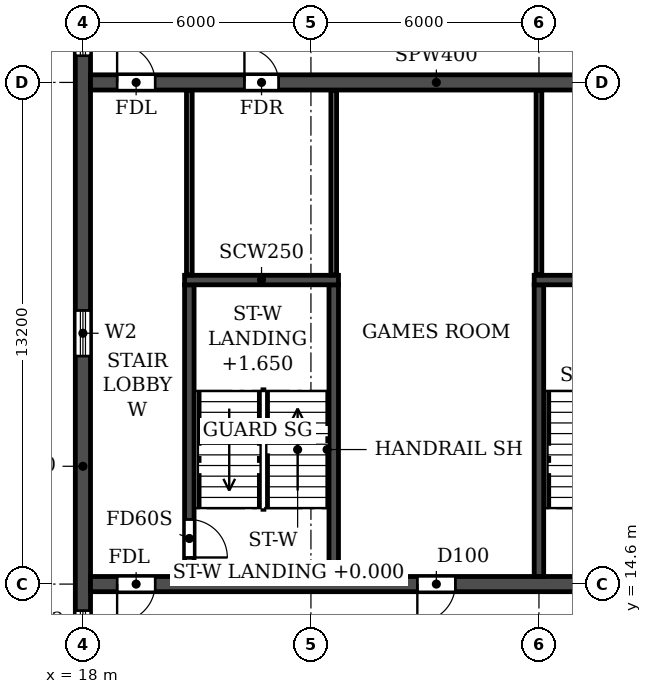
"""IFC4 building model, lengths in metres.
Left out: names, types, materials, properties, quantities, classifications, styles, units other than length and angle.
Written with IfcOpenShell. Run it as: python <this file> out.ifc"""

import sys

from ifc_helpers import new_model, si_unit, direction, frame, frame_2d, origin, place, context, subcontext, project, spatial, rectangle, extrude, element, fill, save


model = new_model("IFC4")
c1 = context("Model", 3, precision=1e-05, world=origin(), true_north=direction((0.0, 1.0)))
c2 = subcontext(c1, "Body", "Model", "MODEL_VIEW")
j1 = project(units=[si_unit("LENGTHUNIT", "METRE"), si_unit("PLANEANGLEUNIT", "RADIAN")], contexts=[c1])
p1 = place(None, origin())
s1 = spatial("IfcSite", under=j1, at=p1, CompositionType="ELEMENT")
p2 = place(p1, origin())
s2 = spatial("IfcBuilding", under=s1, at=p2, CompositionType="ELEMENT")
p3 = place(p2, frame((0.0, 0.0, 201.6)))
s3 = spatial("IfcBuildingStorey", under=s2, at=p3, CompositionType="ELEMENT", Elevation=201.6)
p4 = place(p3, frame((18.0, 4.683, 0.0), z_axis=(0.0, 0.0, 1.0), x_axis=(0.0, 1.0, 0.0)))
e1 = element("IfcWall", 1, at=p4, inside=s3, PredefinedType="SHEAR", context=c2, shape_type="SweptSolid", body=[
    extrude(rectangle(XDim=31.834, YDim=0.4, at=frame_2d((15.917, 0.0))), origin(), (0.0, 0.0, 1.0), 3.08),
])
p5 = place(p4, frame((23.817, 0.0, 0.9)))
e2 = element("IfcOpeningElement", 2, at=p5, cuts=e1, PredefinedType="OPENING", context=c2, shape_type="SweptSolid", body=[
    extrude(rectangle(XDim=1.2, YDim=1.5, at=frame_2d((0.6, 0.75))), frame((0.0, 0.21, 0.0), z_axis=(0.0, -1.0, 0.0), x_axis=(1.0, 0.0, 0.0)), (0.0, 0.0, 1.0), 0.42),
])
p6 = place(p4, frame((8.017, 0.0, 0.9)))
e3 = element("IfcOpeningElement", 3, at=p6, cuts=e1, PredefinedType="OPENING", context=c2, shape_type="SweptSolid", body=[
    extrude(rectangle(XDim=1.2, YDim=1.5, at=frame_2d((0.6, 0.75))), frame((0.0, 0.21, 0.0), z_axis=(0.0, -1.0, 0.0), x_axis=(1.0, 0.0, 0.0)), (0.0, 0.0, 1.0), 0.42),
])
p7 = place(p4, frame((27.694, 0.0, 0.6)))
e4 = element("IfcOpeningElement", 4, at=p7, cuts=e1, PredefinedType="OPENING", context=c2, shape_type="SweptSolid", body=[
    extrude(rectangle(XDim=2.2, YDim=1.8, at=frame_2d((1.1, 0.9))), frame((0.0, 0.21, 0.0), z_axis=(0.0, -1.0, 0.0), x_axis=(1.0, 0.0, 0.0)), (0.0, 0.0, 1.0), 0.42),
])
p8 = place(p4, frame((2.541, 0.0, 0.6)))
e5 = element("IfcOpeningElement", 5, at=p8, cuts=e1, PredefinedType="OPENING", context=c2, shape_type="SweptSolid", body=[
    extrude(rectangle(XDim=2.2, YDim=1.8, at=frame_2d((1.1, 0.9))), frame((0.0, 0.21, 0.0), z_axis=(0.0, -1.0, 0.0), x_axis=(1.0, 0.0, 0.0)), (0.0, 0.0, 1.0), 0.42),
])
p9 = place(p4, frame((15.917, 0.0, 0.9)))
e6 = element("IfcOpeningElement", 6, at=p9, cuts=e1, PredefinedType="OPENING", context=c2, shape_type="SweptSolid", body=[
    extrude(rectangle(XDim=1.2, YDim=1.5, at=frame_2d((0.6, 0.75))), frame((0.0, 0.21, 0.0), z_axis=(0.0, -1.0, 0.0), x_axis=(1.0, 0.0, 0.0)), (0.0, 0.0, 1.0), 0.42),
])
p10 = place(p3, frame((18.2, 14.6, 0.0), z_axis=(0.0, 0.0, 1.0), x_axis=(1.0, 0.0, 0.0)))
e7 = element("IfcWall", 7, at=p10, inside=s3, PredefinedType="SOLIDWALL", context=c2, shape_type="SweptSolid", body=[
    extrude(rectangle(XDim=65.6, YDim=0.4, at=frame_2d((32.8, 0.0))), origin(), (0.0, 0.0, 1.0), 3.08),
])
p11 = place(p10, frame((0.7, 0.0, 0.0)))
e8 = element("IfcOpeningElement", 8, at=p11, cuts=e7, PredefinedType="OPENING", context=c2, shape_type="SweptSolid", body=[
    extrude(rectangle(XDim=1.0, YDim=2.1, at=frame_2d((0.5, 1.05))), frame((0.0, 0.21, 0.0), z_axis=(0.0, -1.0, 0.0), x_axis=(1.0, 0.0, 0.0)), (0.0, 0.0, 1.0), 0.42),
])
p12 = place(p10, frame((8.6, 0.0, 0.0)))
e9 = element("IfcOpeningElement", 9, at=p12, cuts=e7, PredefinedType="OPENING", context=c2, shape_type="SweptSolid", body=[
    extrude(rectangle(XDim=1.0, YDim=2.1, at=frame_2d((0.5, 1.05))), frame((0.0, 0.21, 0.0), z_axis=(0.0, -1.0, 0.0), x_axis=(1.0, 0.0, 0.0)), (0.0, 0.0, 1.0), 0.42),
])
p13 = place(p10, frame((13.2, 0.0, 0.0)))
e10 = element("IfcOpeningElement", 10, at=p13, cuts=e7, PredefinedType="OPENING", context=c2, shape_type="SweptSolid", body=[
    extrude(rectangle(XDim=1.0, YDim=2.1, at=frame_2d((0.5, 1.05))), frame((0.0, 0.21, 0.0), z_axis=(0.0, -1.0, 0.0), x_axis=(1.0, 0.0, 0.0)), (0.0, 0.0, 1.0), 0.42),
])
p14 = place(p10, frame((27.1, 0.0, 0.0)))
e11 = element("IfcOpeningElement", 11, at=p14, cuts=e7, PredefinedType="OPENING", context=c2, shape_type="SweptSolid", body=[
    extrude(rectangle(XDim=1.0, YDim=2.1, at=frame_2d((0.5, 1.05))), frame((0.0, 0.21, 0.0), z_axis=(0.0, -1.0, 0.0), x_axis=(1.0, 0.0, 0.0)), (0.0, 0.0, 1.0), 0.42),
])
p15 = place(p10, frame((32.3, 0.0, 0.0)))
e12 = element("IfcOpeningElement", 12, at=p15, cuts=e7, PredefinedType="OPENING", context=c2, shape_type="SweptSolid", body=[
    extrude(rectangle(XDim=1.0, YDim=2.1, at=frame_2d((0.5, 1.05))), frame((0.0, 0.21, 0.0), z_axis=(0.0, -1.0, 0.0), x_axis=(1.0, 0.0, 0.0)), (0.0, 0.0, 1.0), 0.42),
])
p16 = place(p10, frame((34.9, 0.0, 0.0)))
e13 = element("IfcOpeningElement", 13, at=p16, cuts=e7, PredefinedType="OPENING", context=c2, shape_type="SweptSolid", body=[
    extrude(rectangle(XDim=1.0, YDim=2.1, at=frame_2d((0.5, 1.05))), frame((0.0, 0.21, 0.0), z_axis=(0.0, -1.0, 0.0), x_axis=(1.0, 0.0, 0.0)), (0.0, 0.0, 1.0), 0.42),
])
p17 = place(p10, frame((38.8, 0.0, 0.0)))
e14 = element("IfcOpeningElement", 14, at=p17, cuts=e7, PredefinedType="OPENING", context=c2, shape_type="SweptSolid", body=[
    extrude(rectangle(XDim=1.0, YDim=2.1, at=frame_2d((0.5, 1.05))), frame((0.0, 0.21, 0.0), z_axis=(0.0, -1.0, 0.0), x_axis=(1.0, 0.0, 0.0)), (0.0, 0.0, 1.0), 0.42),
])
p18 = place(p10, frame((51.4, 0.0, 0.0)))
e15 = element("IfcOpeningElement", 15, at=p18, cuts=e7, PredefinedType="OPENING", context=c2, shape_type="SweptSolid", body=[
    extrude(rectangle(XDim=1.0, YDim=2.1, at=frame_2d((0.5, 1.05))), frame((0.0, 0.21, 0.0), z_axis=(0.0, -1.0, 0.0), x_axis=(1.0, 0.0, 0.0)), (0.0, 0.0, 1.0), 0.42),
])
p19 = place(p10, frame((56.0, 0.0, 0.0)))
e16 = element("IfcOpeningElement", 16, at=p19, cuts=e7, PredefinedType="OPENING", context=c2, shape_type="SweptSolid", body=[
    extrude(rectangle(XDim=1.0, YDim=2.1, at=frame_2d((0.5, 1.05))), frame((0.0, 0.21, 0.0), z_axis=(0.0, -1.0, 0.0), x_axis=(1.0, 0.0, 0.0)), (0.0, 0.0, 1.0), 0.42),
])
p20 = place(p10, frame((63.9, 0.0, 0.0)))
e17 = element("IfcOpeningElement", 17, at=p20, cuts=e7, PredefinedType="OPENING", context=c2, shape_type="SweptSolid", body=[
    extrude(rectangle(XDim=1.0, YDim=2.1, at=frame_2d((0.5, 1.05))), frame((0.0, 0.21, 0.0), z_axis=(0.0, -1.0, 0.0), x_axis=(1.0, 0.0, 0.0)), (0.0, 0.0, 1.0), 0.42),
])
p21 = place(p3, frame((18.2, 27.8, 0.0), z_axis=(0.0, 0.0, 1.0), x_axis=(1.0, 0.0, 0.0)))
e18 = element("IfcWall", 18, at=p21, inside=s3, PredefinedType="SOLIDWALL", context=c2, shape_type="SweptSolid", body=[
    extrude(rectangle(XDim=65.6, YDim=0.4, at=frame_2d((32.8, 0.0))), origin(), (0.0, 0.0, 1.0), 3.08),
])
p22 = place(p21, frame((0.7, 0.0, 0.0)))
e19 = element("IfcOpeningElement", 19, at=p22, cuts=e18, PredefinedType="OPENING", context=c2, shape_type="SweptSolid", body=[
    extrude(rectangle(XDim=1.0, YDim=2.1, at=frame_2d((0.5, 1.05))), frame((0.0, 0.21, 0.0), z_axis=(0.0, -1.0, 0.0), x_axis=(1.0, 0.0, 0.0)), (0.0, 0.0, 1.0), 0.42),
])
p23 = place(p21, frame((4.05, 0.0, 0.0)))
e20 = element("IfcOpeningElement", 20, at=p23, cuts=e18, PredefinedType="OPENING", context=c2, shape_type="SweptSolid", body=[
    extrude(rectangle(XDim=0.9, YDim=2.1, at=frame_2d((0.45, 1.05))), frame((0.0, 0.21, 0.0), z_axis=(0.0, -1.0, 0.0), x_axis=(1.0, 0.0, 0.0)), (0.0, 0.0, 1.0), 0.42),
])
p24 = place(p21, frame((13.25, 0.0, 0.0)))
e21 = element("IfcOpeningElement", 21, at=p24, cuts=e18, PredefinedType="OPENING", context=c2, shape_type="SweptSolid", body=[
    extrude(rectangle(XDim=0.9, YDim=2.1, at=frame_2d((0.45, 1.05))), frame((0.0, 0.21, 0.0), z_axis=(0.0, -1.0, 0.0), x_axis=(1.0, 0.0, 0.0)), (0.0, 0.0, 1.0), 0.42),
])
p25 = place(p21, frame((17.7, 0.0, 0.0)))
e22 = element("IfcOpeningElement", 22, at=p25, cuts=e18, PredefinedType="OPENING", context=c2, shape_type="SweptSolid", body=[
    extrude(rectangle(XDim=1.0, YDim=2.1, at=frame_2d((0.5, 1.05))), frame((0.0, 0.21, 0.0), z_axis=(0.0, -1.0, 0.0), x_axis=(1.0, 0.0, 0.0)), (0.0, 0.0, 1.0), 0.42),
])
p26 = place(p21, frame((22.9, 0.0, 0.0)))
e23 = element("IfcOpeningElement", 23, at=p26, cuts=e18, PredefinedType="OPENING", context=c2, shape_type="SweptSolid", body=[
    extrude(rectangle(XDim=1.0, YDim=2.1, at=frame_2d((0.5, 1.05))), frame((0.0, 0.21, 0.0), z_axis=(0.0, -1.0, 0.0), x_axis=(1.0, 0.0, 0.0)), (0.0, 0.0, 1.0), 0.42),
])
p27 = place(p21, frame((29.4, 0.0, 0.0)))
e24 = element("IfcOpeningElement", 24, at=p27, cuts=e18, PredefinedType="OPENING", context=c2, shape_type="SweptSolid", body=[
    extrude(rectangle(XDim=1.0, YDim=2.1, at=frame_2d((0.5, 1.05))), frame((0.0, 0.21, 0.0), z_axis=(0.0, -1.0, 0.0), x_axis=(1.0, 0.0, 0.0)), (0.0, 0.0, 1.0), 0.42),
])
p28 = place(p21, frame((32.3, 0.0, 0.0)))
e25 = element("IfcOpeningElement", 25, at=p28, cuts=e18, PredefinedType="OPENING", context=c2, shape_type="SweptSolid", body=[
    extrude(rectangle(XDim=1.0, YDim=2.1, at=frame_2d((0.5, 1.05))), frame((0.0, 0.21, 0.0), z_axis=(0.0, -1.0, 0.0), x_axis=(1.0, 0.0, 0.0)), (0.0, 0.0, 1.0), 0.42),
])
p29 = place(p21, frame((35.2, 0.0, 0.0)))
e26 = element("IfcOpeningElement", 26, at=p29, cuts=e18, PredefinedType="OPENING", context=c2, shape_type="SweptSolid", body=[
    extrude(rectangle(XDim=1.0, YDim=2.1, at=frame_2d((0.5, 1.05))), frame((0.0, 0.21, 0.0), z_axis=(0.0, -1.0, 0.0), x_axis=(1.0, 0.0, 0.0)), (0.0, 0.0, 1.0), 0.42),
])
p30 = place(p21, frame((37.8, 0.0, 0.0)))
e27 = element("IfcOpeningElement", 27, at=p30, cuts=e18, PredefinedType="OPENING", context=c2, shape_type="SweptSolid", body=[
    extrude(rectangle(XDim=1.0, YDim=2.1, at=frame_2d((0.5, 1.05))), frame((0.0, 0.21, 0.0), z_axis=(0.0, -1.0, 0.0), x_axis=(1.0, 0.0, 0.0)), (0.0, 0.0, 1.0), 0.42),
])
p31 = place(p21, frame((40.4, 0.0, 0.0)))
e28 = element("IfcOpeningElement", 28, at=p31, cuts=e18, PredefinedType="OPENING", context=c2, shape_type="SweptSolid", body=[
    extrude(rectangle(XDim=1.0, YDim=2.1, at=frame_2d((0.5, 1.05))), frame((0.0, 0.21, 0.0), z_axis=(0.0, -1.0, 0.0), x_axis=(1.0, 0.0, 0.0)), (0.0, 0.0, 1.0), 0.42),
])
p32 = place(p21, frame((43.0, 0.0, 0.0)))
e29 = element("IfcOpeningElement", 29, at=p32, cuts=e18, PredefinedType="OPENING", context=c2, shape_type="SweptSolid", body=[
    extrude(rectangle(XDim=1.0, YDim=2.1, at=frame_2d((0.5, 1.05))), frame((0.0, 0.21, 0.0), z_axis=(0.0, -1.0, 0.0), x_axis=(1.0, 0.0, 0.0)), (0.0, 0.0, 1.0), 0.42),
])
p33 = place(p21, frame((46.9, 0.0, 0.0)))
e30 = element("IfcOpeningElement", 30, at=p33, cuts=e18, PredefinedType="OPENING", context=c2, shape_type="SweptSolid", body=[
    extrude(rectangle(XDim=1.0, YDim=2.1, at=frame_2d((0.5, 1.05))), frame((0.0, 0.21, 0.0), z_axis=(0.0, -1.0, 0.0), x_axis=(1.0, 0.0, 0.0)), (0.0, 0.0, 1.0), 0.42),
])
p34 = place(p21, frame((51.45, 0.0, 0.0)))
e31 = element("IfcOpeningElement", 31, at=p34, cuts=e18, PredefinedType="OPENING", context=c2, shape_type="SweptSolid", body=[
    extrude(rectangle(XDim=0.9, YDim=2.1, at=frame_2d((0.45, 1.05))), frame((0.0, 0.21, 0.0), z_axis=(0.0, -1.0, 0.0), x_axis=(1.0, 0.0, 0.0)), (0.0, 0.0, 1.0), 0.42),
])
p35 = place(p21, frame((60.65, 0.0, 0.0)))
e32 = element("IfcOpeningElement", 32, at=p35, cuts=e18, PredefinedType="OPENING", context=c2, shape_type="SweptSolid", body=[
    extrude(rectangle(XDim=0.9, YDim=2.1, at=frame_2d((0.45, 1.05))), frame((0.0, 0.21, 0.0), z_axis=(0.0, -1.0, 0.0), x_axis=(1.0, 0.0, 0.0)), (0.0, 0.0, 1.0), 0.42),
])
p36 = place(p21, frame((63.9, 0.0, 0.0)))
e33 = element("IfcOpeningElement", 33, at=p36, cuts=e18, PredefinedType="OPENING", context=c2, shape_type="SweptSolid", body=[
    extrude(rectangle(XDim=1.0, YDim=2.1, at=frame_2d((0.5, 1.05))), frame((0.0, 0.21, 0.0), z_axis=(0.0, -1.0, 0.0), x_axis=(1.0, 0.0, 0.0)), (0.0, 0.0, 1.0), 0.42),
])
p37 = place(p3, frame((30.0, 14.8, 0.0), z_axis=(0.0, 0.0, 1.0), x_axis=(0.0, 1.0, 0.0)))
e34 = element("IfcWall", 34, at=p37, inside=s3, PredefinedType="SOLIDWALL", context=c2, shape_type="SweptSolid", body=[
    extrude(rectangle(XDim=7.675, YDim=0.25, at=frame_2d((3.837, 0.0))), origin(), (0.0, 0.0, 1.0), 3.08),
])
p38 = place(p3, frame((29.875, 22.6, 0.0), z_axis=(0.0, 0.0, 1.0), x_axis=(1.0, 0.0, 0.0)))
e35 = element("IfcWall", 35, at=p38, inside=s3, PredefinedType="SOLIDWALL", context=c2, shape_type="SweptSolid", body=[
    extrude(rectangle(XDim=4.05, YDim=0.25, at=frame_2d((2.025, 0.0))), origin(), (0.0, 0.0, 1.0), 3.08),
])
p39 = place(p3, frame((20.8, 14.8, 0.0), z_axis=(0.0, 0.0, 1.0), x_axis=(0.0, 1.0, 0.0)))
e36 = element("IfcWall", 36, at=p39, inside=s3, PredefinedType="SOLIDWALL", context=c2, shape_type="SweptSolid", body=[
    extrude(rectangle(XDim=7.675, YDim=0.25, at=frame_2d((3.837, 0.0))), origin(), (0.0, 0.0, 1.0), 3.08),
])
p40 = place(p39, frame((0.5, 0.0, 0.0)))
e37 = element("IfcOpeningElement", 37, at=p40, cuts=e36, PredefinedType="OPENING", context=c2, shape_type="SweptSolid", body=[
    extrude(rectangle(XDim=1.0, YDim=2.1, at=frame_2d((0.5, 1.05))), frame((0.0, 0.135, 0.0), z_axis=(0.0, -1.0, 0.0), x_axis=(1.0, 0.0, 0.0)), (0.0, 0.0, 1.0), 0.27),
])
p41 = place(p3, frame((24.6, 14.8, 0.0), z_axis=(0.0, 0.0, 1.0), x_axis=(0.0, 1.0, 0.0)))
e38 = element("IfcWall", 38, at=p41, inside=s3, PredefinedType="SOLIDWALL", context=c2, shape_type="SweptSolid", body=[
    extrude(rectangle(XDim=7.675, YDim=0.25, at=frame_2d((3.837, 0.0))), origin(), (0.0, 0.0, 1.0), 3.08),
])
p42 = place(p3, frame((20.675, 22.6, 0.0), z_axis=(0.0, 0.0, 1.0), x_axis=(1.0, 0.0, 0.0)))
e39 = element("IfcWall", 39, at=p42, inside=s3, PredefinedType="SOLIDWALL", context=c2, shape_type="SweptSolid", body=[
    extrude(rectangle(XDim=4.05, YDim=0.25, at=frame_2d((2.025, 0.0))), origin(), (0.0, 0.0, 1.0), 3.08),
])
for number, where, z_axis, x_axis in (
    (40, (20.8, 22.735, 0.0), (0.0, 0.0, 1.0), (0.0, 1.0, 0.0)),
    (41, (24.6, 22.735, 0.0), (0.0, 0.0, 1.0), (0.0, 1.0, 0.0)),
    (42, (30.0, 22.735, 0.0), (0.0, 0.0, 1.0), (0.0, 1.0, 0.0)),
):
    element("IfcWall", number, at=place(p3, frame(where, z_axis=z_axis, x_axis=x_axis)), inside=s3, PredefinedType="PARTITIONING", context=c2, shape_type="SweptSolid", body=[
        extrude(rectangle(XDim=4.855, YDim=0.15, at=frame_2d((2.427, 0.0))), origin(), (0.0, 0.0, 1.0), 3.08),
    ])
p43 = place(p5, origin())
e43 = element("IfcWindow", 43, at=p43, inside=s3, PartitioningType="SINGLE_PANEL", PredefinedType="WINDOW", context=c2, shape_type="SweptSolid", body=[
    extrude(rectangle(XDim=1.2, YDim=1.5, at=frame_2d((0.6, 0.75))), frame((0.0, 0.03, 0.0), z_axis=(0.0, -1.0, 0.0), x_axis=(1.0, 0.0, 0.0)), (0.0, 0.0, 1.0), 0.06),
])
fill(e2, e43)
p44 = place(p6, origin())
e44 = element("IfcWindow", 44, at=p44, inside=s3, PartitioningType="SINGLE_PANEL", PredefinedType="WINDOW", context=c2, shape_type="SweptSolid", body=[
    extrude(rectangle(XDim=1.2, YDim=1.5, at=frame_2d((0.6, 0.75))), frame((0.0, 0.03, 0.0), z_axis=(0.0, -1.0, 0.0), x_axis=(1.0, 0.0, 0.0)), (0.0, 0.0, 1.0), 0.06),
])
fill(e3, e44)
p45 = place(p9, origin())
e45 = element("IfcWindow", 45, at=p45, inside=s3, PartitioningType="SINGLE_PANEL", PredefinedType="WINDOW", context=c2, shape_type="SweptSolid", body=[
    extrude(rectangle(XDim=1.2, YDim=1.5, at=frame_2d((0.6, 0.75))), frame((0.0, 0.03, 0.0), z_axis=(0.0, -1.0, 0.0), x_axis=(1.0, 0.0, 0.0)), (0.0, 0.0, 1.0), 0.06),
])
fill(e6, e45)
p46 = place(p22, origin())
e46 = element("IfcDoor", 46, at=p46, inside=s3, OperationType="SINGLE_SWING_LEFT", PredefinedType="DOOR", context=c2, shape_type="SweptSolid", body=[
    extrude(rectangle(XDim=1.0, YDim=2.1, at=frame_2d((0.5, 1.05))), frame((0.0, 0.025, 0.0), z_axis=(0.0, -1.0, 0.0), x_axis=(1.0, 0.0, 0.0)), (0.0, 0.0, 1.0), 0.05),
])
fill(e19, e46)
p47 = place(p23, origin())
e47 = element("IfcDoor", 47, at=p47, inside=s3, OperationType="SINGLE_SWING_LEFT", PredefinedType="DOOR", context=c2, shape_type="SweptSolid", body=[
    extrude(rectangle(XDim=0.9, YDim=2.1, at=frame_2d((0.45, 1.05))), frame((0.0, 0.025, 0.0), z_axis=(0.0, -1.0, 0.0), x_axis=(1.0, 0.0, 0.0)), (0.0, 0.0, 1.0), 0.05),
])
fill(e20, e47)
p48 = place(p11, frame((1.0, 0.0, 0.0), z_axis=(0.0, 0.0, 1.0), x_axis=(-1.0, 0.0, 0.0)))
e48 = element("IfcDoor", 48, at=p48, inside=s3, OperationType="SINGLE_SWING_RIGHT", PredefinedType="DOOR", context=c2, shape_type="SweptSolid", body=[
    extrude(rectangle(XDim=1.0, YDim=2.1, at=frame_2d((0.5, 1.05))), frame((0.0, 0.025, 0.0), z_axis=(0.0, -1.0, 0.0), x_axis=(1.0, 0.0, 0.0)), (0.0, 0.0, 1.0), 0.05),
])
fill(e8, e48)
p49 = place(p12, frame((1.0, 0.0, 0.0), z_axis=(0.0, 0.0, 1.0), x_axis=(-1.0, 0.0, 0.0)))
e49 = element("IfcDoor", 49, at=p49, inside=s3, OperationType="SINGLE_SWING_RIGHT", PredefinedType="DOOR", context=c2, shape_type="SweptSolid", body=[
    extrude(rectangle(XDim=1.0, YDim=2.1, at=frame_2d((0.5, 1.05))), frame((0.0, 0.025, 0.0), z_axis=(0.0, -1.0, 0.0), x_axis=(1.0, 0.0, 0.0)), (0.0, 0.0, 1.0), 0.05),
])
fill(e9, e49)
p50 = place(p40, frame((1.0, 0.0, 0.0), z_axis=(0.0, 0.0, 1.0), x_axis=(-1.0, 0.0, 0.0)))
e50 = element("IfcDoor", 50, at=p50, inside=s3, OperationType="SINGLE_SWING_RIGHT", PredefinedType="DOOR", context=c2, shape_type="SweptSolid", body=[
    extrude(rectangle(XDim=1.0, YDim=2.1, at=frame_2d((0.5, 1.05))), frame((0.0, 0.025, 0.0), z_axis=(0.0, -1.0, 0.0), x_axis=(1.0, 0.0, 0.0)), (0.0, 0.0, 1.0), 0.05),
])
fill(e37, e50)
save(model, sys.argv[1])
